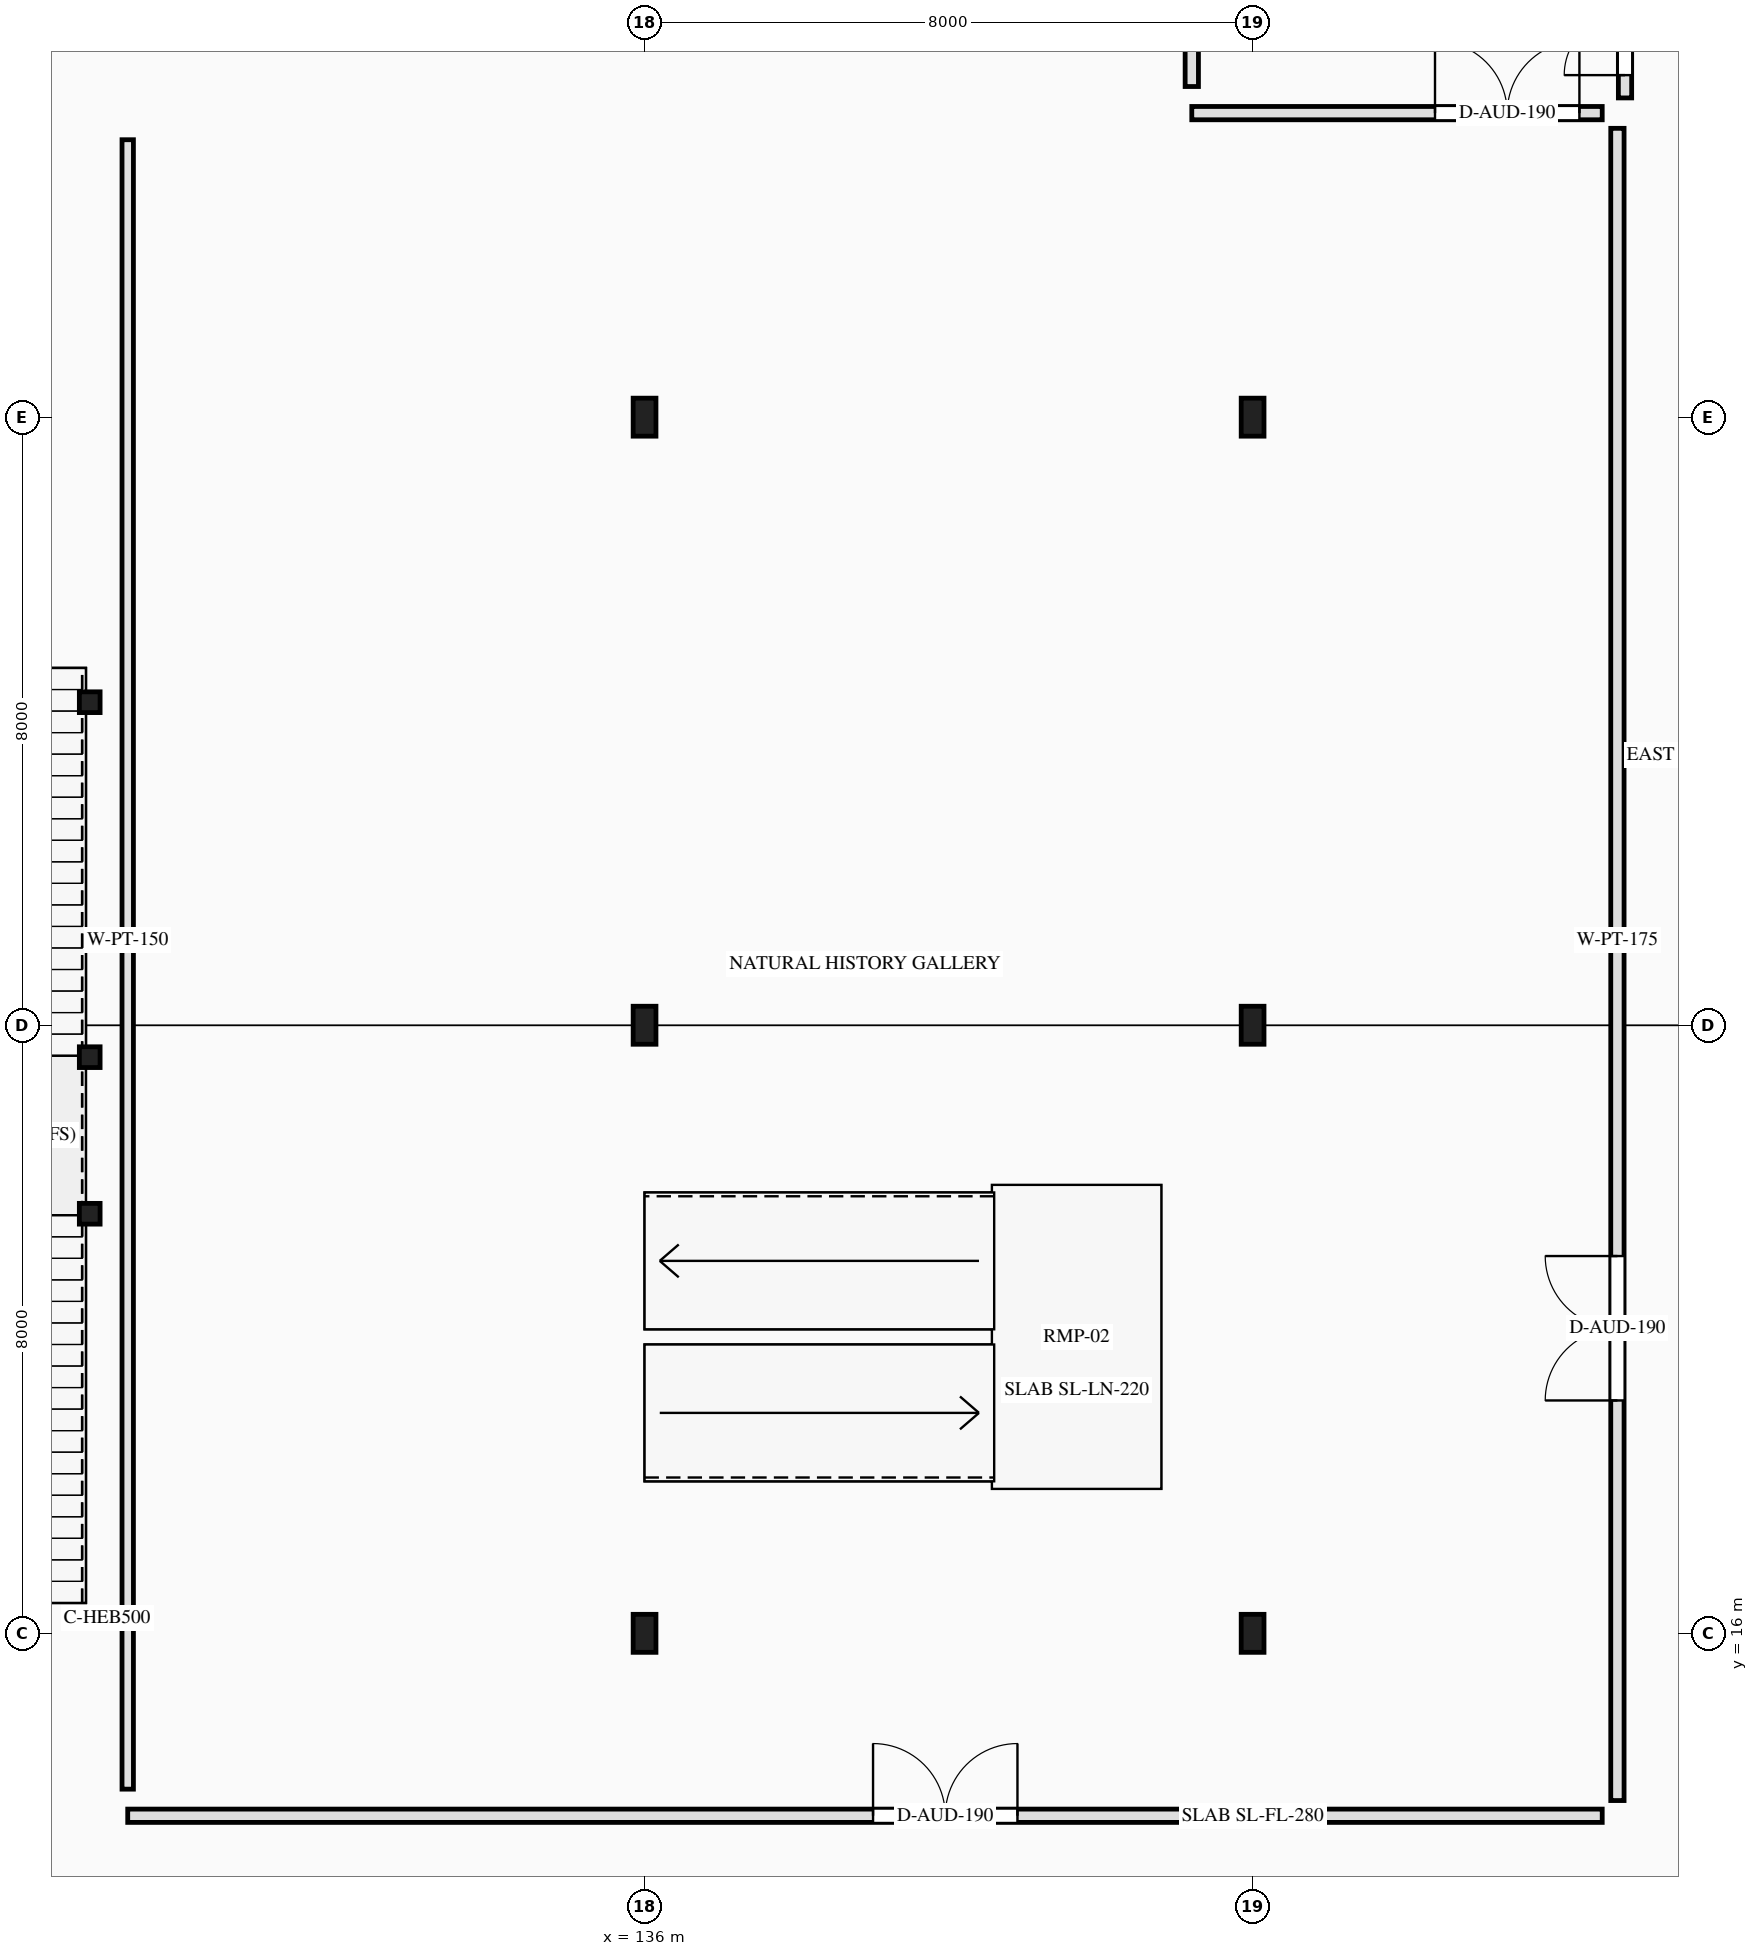
"""IFC4 building model, lengths in metres.
Left out: names, types, materials, properties, quantities, classifications, styles, units other than length and angle.
Written with IfcOpenShell. Run it as: python <this file> out.ifc"""

import sys

from ifc_helpers import new_model, si_unit, direction, frame, frame_2d, origin, origin_2d, place, context, subcontext, project, spatial, rectangle, hollow_circle, i_section, extrude, element, fill, save


model = new_model("IFC4")
c1 = context("Model", 3, precision=1e-05, world=origin(), true_north=direction((0.0, 1.0)))
c2 = subcontext(c1, "Body", "Model", "MODEL_VIEW")
j1 = project(units=[si_unit("LENGTHUNIT", "METRE"), si_unit("PLANEANGLEUNIT", "RADIAN")], contexts=[c1])
p1 = place(None, origin())
s1 = spatial("IfcSite", under=j1, at=p1, CompositionType="ELEMENT")
p2 = place(p1, origin())
s2 = spatial("IfcBuilding", under=s1, at=p2, CompositionType="ELEMENT")
p3 = place(p2, origin())
s3 = spatial("IfcBuildingStorey", under=s2, at=p3, CompositionType="ELEMENT", Elevation=0.0)
for number, where, z_axis, x_axis in (
    (1, (136.0, 16.0, 0.0), (0.0, 0.0, 1.0), (1.0, 0.0, 0.0)),
    (2, (136.0, 24.0, 0.0), (0.0, 0.0, 1.0), (1.0, 0.0, 0.0)),
    (3, (136.0, 32.0, 0.0), (0.0, 0.0, 1.0), (1.0, 0.0, 0.0)),
    (4, (144.0, 16.0, 0.0), (0.0, 0.0, 1.0), (1.0, 0.0, 0.0)),
    (5, (144.0, 24.0, 0.0), (0.0, 0.0, 1.0), (1.0, 0.0, 0.0)),
    (6, (144.0, 32.0, 0.0), (0.0, 0.0, 1.0), (1.0, 0.0, 0.0)),
):
    element("IfcColumn", number, at=place(p3, frame(where, z_axis=z_axis, x_axis=x_axis)), inside=s3, PredefinedType="COLUMN", context=c2, shape_type="SweptSolid", body=[
        extrude(i_section(OverallWidth=0.3, OverallDepth=0.5, WebThickness=0.014, FlangeThickness=0.028, FilletRadius=0.027, at=origin_2d()), origin(), (0.0, 0.0, 1.0), 5.4),
    ])
for number, where, z_axis, x_axis in (
    (7, (128.7, 21.52, 0.0), (0.0, 0.0, 1.0), (1.0, 0.0, 0.0)),
    (8, (128.7, 23.58, 0.0), (0.0, 0.0, 1.0), (1.0, 0.0, 0.0)),
):
    element("IfcColumn", number, at=place(p3, frame(where, z_axis=z_axis, x_axis=x_axis)), inside=s3, PredefinedType="COLUMN", context=c2, shape_type="SweptSolid", body=[
        extrude(hollow_circle(Radius=0.136, WallThickness=0.012, at=origin_2d()), origin(), (0.0, 0.0, 1.0), 2.38),
    ])
p4 = place(p3, frame((128.7, 28.25, 0.0), z_axis=(0.0, 0.0, 1.0), x_axis=(1.0, 0.0, 0.0)))
e9 = element("IfcColumn", 9, at=p4, inside=s3, PredefinedType="COLUMN", context=c2, shape_type="SweptSolid", body=[
    extrude(hollow_circle(Radius=0.136, WallThickness=0.012, at=origin_2d()), origin(), (0.0, 0.0, 1.0), 4.86),
])
p5 = place(p3, frame((148.9, 36.2, 0.0), z_axis=(0.0, 0.0, 1.0), x_axis=(0.0, 1.0, 0.0)))
e10 = element("IfcWall", 10, at=p5, inside=s3, PredefinedType="PARTITIONING", context=c2, shape_type="SweptSolid", body=[
    extrude(rectangle(XDim=4.6, YDim=0.175, at=frame_2d((2.3, 0.0))), origin(), (0.0, 0.0, 1.0), 5.16),
])
p6 = place(p5, frame((0.3, 0.0, 0.0)))
e11 = element("IfcOpeningElement", 11, at=p6, cuts=e10, PredefinedType="OPENING", context=c2, shape_type="SweptSolid", body=[
    extrude(rectangle(XDim=1.6, YDim=2.25, at=frame_2d((0.8, 1.125))), frame((0.0, 0.097, 0.0), z_axis=(0.0, -1.0, 0.0), x_axis=(1.0, 0.0, 0.0)), (0.0, 0.0, 1.0), 0.195),
])
p7 = place(p3, frame((143.2, 36.0, 0.0), z_axis=(0.0, 0.0, 1.0), x_axis=(1.0, 0.0, 0.0)))
e12 = element("IfcWall", 12, at=p7, inside=s3, PredefinedType="PARTITIONING", context=c2, shape_type="SweptSolid", body=[
    extrude(rectangle(XDim=5.4, YDim=0.175, at=frame_2d((2.7, 0.0))), origin(), (0.0, 0.0, 1.0), 5.16),
])
p8 = place(p7, frame((3.2, 0.0, 0.0)))
e13 = element("IfcOpeningElement", 13, at=p8, cuts=e12, PredefinedType="OPENING", context=c2, shape_type="SweptSolid", body=[
    extrude(rectangle(XDim=1.9, YDim=2.35, at=frame_2d((0.95, 1.175))), frame((0.0, 0.097, 0.0), z_axis=(0.0, -1.0, 0.0), x_axis=(1.0, 0.0, 0.0)), (0.0, 0.0, 1.0), 0.195),
])
p9 = place(p3, frame((129.2, 13.6, 0.0), z_axis=(0.0, 0.0, 1.0), x_axis=(1.0, 0.0, 0.0)))
e14 = element("IfcWall", 14, at=p9, inside=s3, PredefinedType="PARTITIONING", context=c2, shape_type="SweptSolid", body=[
    extrude(rectangle(XDim=19.4, YDim=0.175, at=frame_2d((9.7, 0.0))), origin(), (0.0, 0.0, 1.0), 5.16),
])
p10 = place(p9, frame((9.806, 0.0, 0.0)))
e15 = element("IfcOpeningElement", 15, at=p10, cuts=e14, PredefinedType="OPENING", context=c2, shape_type="SweptSolid", body=[
    extrude(rectangle(XDim=1.9, YDim=2.35, at=frame_2d((0.95, 1.175))), frame((0.0, 0.097, 0.0), z_axis=(0.0, -1.0, 0.0), x_axis=(1.0, 0.0, 0.0)), (0.0, 0.0, 1.0), 0.195),
])
p11 = place(p3, frame((148.8, 13.8, 0.0), z_axis=(0.0, 0.0, 1.0), x_axis=(0.0, 1.0, 0.0)))
e16 = element("IfcWall", 16, at=p11, inside=s3, PredefinedType="PARTITIONING", context=c2, shape_type="SweptSolid", body=[
    extrude(rectangle(XDim=22.0, YDim=0.175, at=frame_2d((11.0, 0.0))), origin(), (0.0, 0.0, 1.0), 5.16),
])
p12 = place(p11, frame((5.264, 0.0, 0.0)))
e17 = element("IfcOpeningElement", 17, at=p12, cuts=e16, PredefinedType="OPENING", context=c2, shape_type="SweptSolid", body=[
    extrude(rectangle(XDim=1.9, YDim=2.35, at=frame_2d((0.95, 1.175))), frame((0.0, 0.097, 0.0), z_axis=(0.0, -1.0, 0.0), x_axis=(1.0, 0.0, 0.0)), (0.0, 0.0, 1.0), 0.195),
])
p13 = place(p3, frame((143.2, 36.35, 0.0), z_axis=(0.0, 0.0, 1.0), x_axis=(0.0, 1.0, 0.0)))
e18 = element("IfcWall", 18, at=p13, inside=s3, PredefinedType="PARTITIONING", context=c2, shape_type="SweptSolid", body=[
    extrude(rectangle(XDim=4.3, YDim=0.175, at=frame_2d((2.15, 0.0))), origin(), (0.0, 0.0, 1.0), 5.16),
])
p14 = place(p3, frame((129.2, 13.95, 0.0), z_axis=(0.0, 0.0, 1.0), x_axis=(0.0, 1.0, 0.0)))
e19 = element("IfcWall", 19, at=p14, inside=s3, PredefinedType="PARTITIONING", context=c2, shape_type="SweptSolid", body=[
    extrude(rectangle(XDim=21.7, YDim=0.15, at=frame_2d((10.85, 0.0))), origin(), (0.0, 0.0, 1.0), 5.16),
])
p15 = place(p6, origin())
e20 = element("IfcDoor", 20, at=p15, inside=s3, OperationType="DOUBLE_DOOR_SINGLE_SWING", PredefinedType="DOOR", context=c2, shape_type="SweptSolid", body=[
    extrude(rectangle(XDim=1.6, YDim=2.25, at=frame_2d((0.8, 1.125))), frame((0.0, 0.025, 0.0), z_axis=(0.0, -1.0, 0.0), x_axis=(1.0, 0.0, 0.0)), (0.0, 0.0, 1.0), 0.05),
])
fill(e11, e20)
p16 = place(p8, origin())
e21 = element("IfcDoor", 21, at=p16, inside=s3, OperationType="DOUBLE_DOOR_SINGLE_SWING", PredefinedType="DOOR", context=c2, shape_type="SweptSolid", body=[
    extrude(rectangle(XDim=1.9, YDim=2.35, at=frame_2d((0.95, 1.175))), frame((0.0, 0.025, 0.0), z_axis=(0.0, -1.0, 0.0), x_axis=(1.0, 0.0, 0.0)), (0.0, 0.0, 1.0), 0.05),
])
fill(e13, e21)
p17 = place(p10, origin())
e22 = element("IfcDoor", 22, at=p17, inside=s3, OperationType="DOUBLE_DOOR_SINGLE_SWING", PredefinedType="DOOR", context=c2, shape_type="SweptSolid", body=[
    extrude(rectangle(XDim=1.9, YDim=2.35, at=frame_2d((0.95, 1.175))), frame((0.0, 0.025, 0.0), z_axis=(0.0, -1.0, 0.0), x_axis=(1.0, 0.0, 0.0)), (0.0, 0.0, 1.0), 0.05),
])
fill(e15, e22)
p18 = place(p12, origin())
e23 = element("IfcDoor", 23, at=p18, inside=s3, OperationType="DOUBLE_DOOR_SINGLE_SWING", PredefinedType="DOOR", context=c2, shape_type="SweptSolid", body=[
    extrude(rectangle(XDim=1.9, YDim=2.35, at=frame_2d((0.95, 1.175))), frame((0.0, 0.025, 0.0), z_axis=(0.0, -1.0, 0.0), x_axis=(1.0, 0.0, 0.0)), (0.0, 0.0, 1.0), 0.05),
])
fill(e17, e23)
save(model, sys.argv[1])
